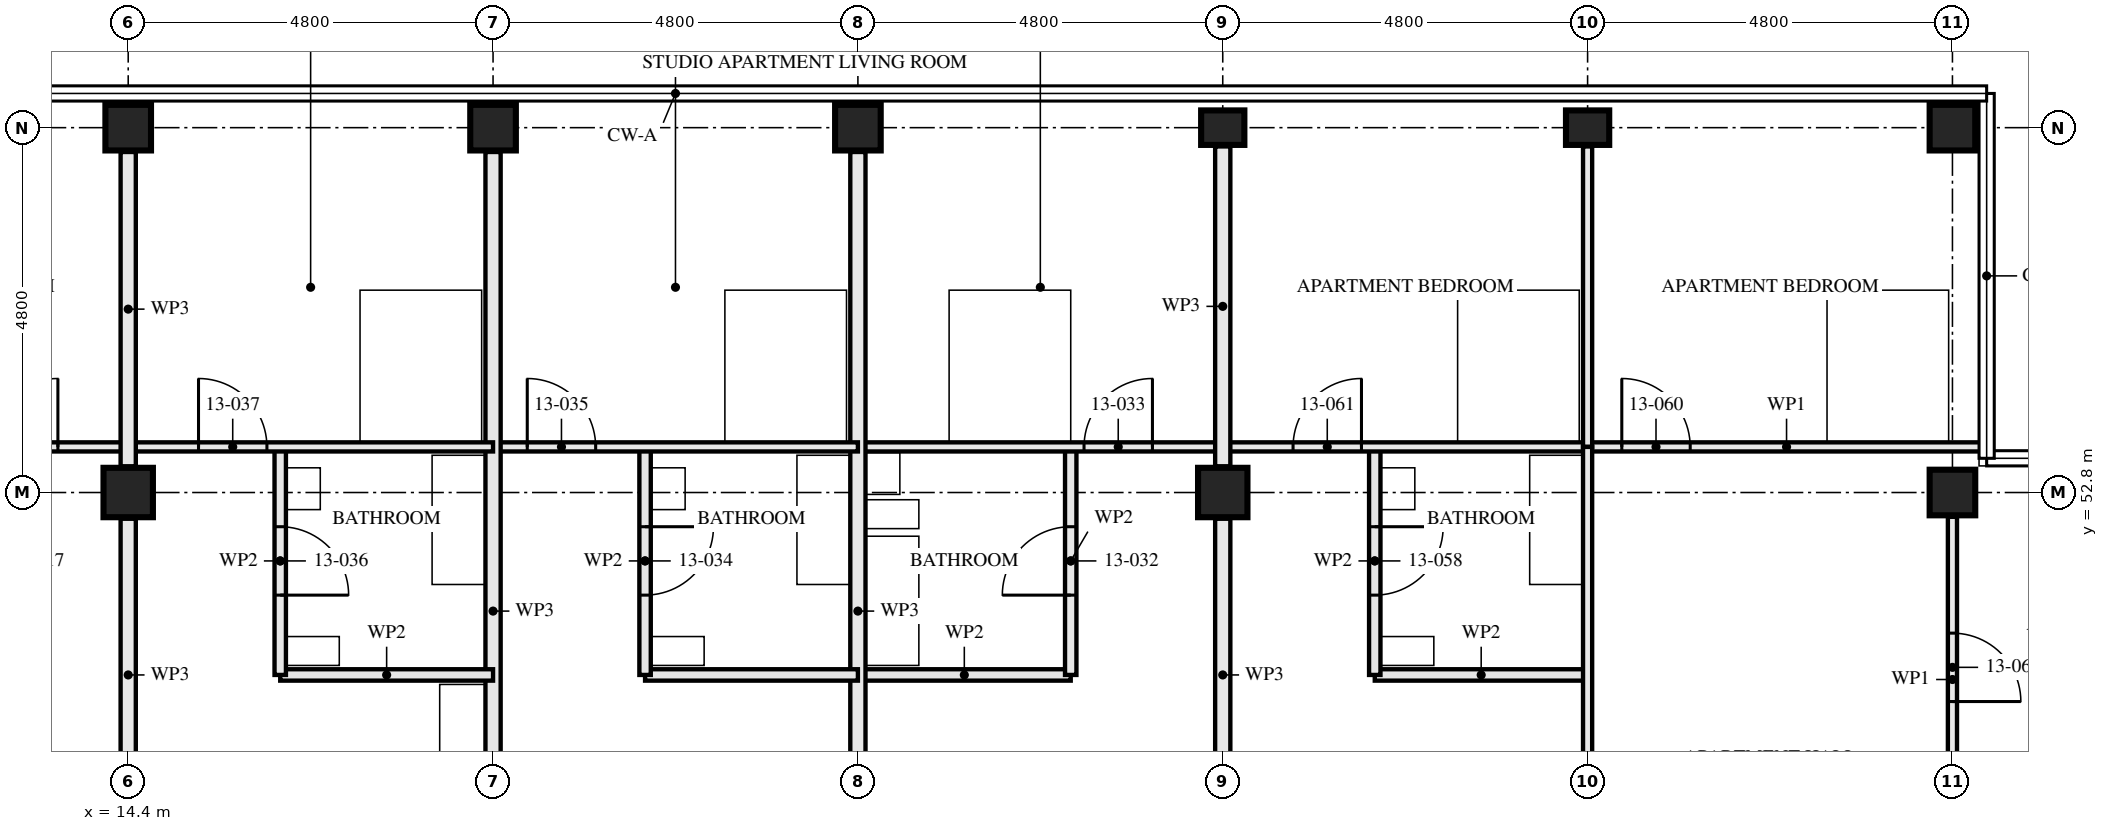
"""IFC4 building model, lengths in metres.
Left out: names, types, materials, properties, quantities, classifications, styles, units other than length and angle.
Written with IfcOpenShell. Run it as: python <this file> out.ifc"""

import sys

from ifc_helpers import new_model, si_unit, direction, frame, frame_2d, origin, origin_2d, place, context, subcontext, project, spatial, rectangle, hollow_rectangle, i_section, extrude, element, fill, save


model = new_model("IFC4")
c1 = context("Model", 3, precision=1e-05, world=origin(), true_north=direction((0.0, 1.0)))
c2 = subcontext(c1, "Body", "Model", "MODEL_VIEW")
j1 = project(units=[si_unit("LENGTHUNIT", "METRE"), si_unit("PLANEANGLEUNIT", "RADIAN")], contexts=[c1])
p1 = place(None, origin())
s1 = spatial("IfcSite", under=j1, at=p1, CompositionType="ELEMENT")
p2 = place(p1, origin())
s2 = spatial("IfcBuilding", under=s1, at=p2, CompositionType="ELEMENT")
p3 = place(p2, frame((0.0, 0.0, 51.5)))
s3 = spatial("IfcBuildingStorey", under=s2, at=p3, CompositionType="ELEMENT", Elevation=51.5)
p4 = place(p3, frame((14.4, 52.8, 0.0), z_axis=(0.0, 0.0, 1.0), x_axis=(1.0, 0.0, 0.0)))
e1 = element("IfcColumn", 1, at=p4, inside=s3, PredefinedType="COLUMN", context=c2, shape_type="SweptSolid", body=[
    extrude(hollow_rectangle(XDim=0.65, YDim=0.65, WallThickness=0.05, at=origin_2d()), origin(), (0.0, 0.0, 1.0), 3.5),
])
for number, where, z_axis, x_axis in (
    (2, (14.4, 57.6, 0.0), (0.0, 0.0, 1.0), (0.0, 1.0, 0.0)),
    (3, (19.2, 57.6, 0.0), (0.0, 0.0, 1.0), (0.0, 1.0, 0.0)),
    (4, (24.0, 57.6, 0.0), (0.0, 0.0, 1.0), (0.0, 1.0, 0.0)),
):
    element("IfcColumn", number, at=place(p3, frame(where, z_axis=z_axis, x_axis=x_axis)), inside=s3, PredefinedType="COLUMN", context=c2, shape_type="SweptSolid", body=[
        extrude(hollow_rectangle(XDim=0.6, YDim=0.6, WallThickness=0.08, at=origin_2d()), origin(), (0.0, 0.0, 1.0), 3.5),
    ])
p5 = place(p3, frame((28.8, 52.8, 0.0), z_axis=(0.0, 0.0, 1.0), x_axis=(1.0, 0.0, 0.0)))
e5 = element("IfcColumn", 5, at=p5, inside=s3, PredefinedType="COLUMN", context=c2, shape_type="SweptSolid", body=[
    extrude(hollow_rectangle(XDim=0.65, YDim=0.65, WallThickness=0.05, at=origin_2d()), origin(), (0.0, 0.0, 1.0), 3.5),
])
for number, where, z_axis, x_axis in (
    (6, (28.8, 57.6, 0.0), (0.0, 0.0, 1.0), (0.0, 1.0, 0.0)),
    (7, (33.6, 57.6, 0.0), (0.0, 0.0, 1.0), (0.0, 1.0, 0.0)),
):
    element("IfcColumn", number, at=place(p3, frame(where, z_axis=z_axis, x_axis=x_axis)), inside=s3, PredefinedType="COLUMN", context=c2, shape_type="SweptSolid", body=[
        extrude(i_section(OverallWidth=0.454, OverallDepth=0.569, WebThickness=0.078, FlangeThickness=0.125, FilletRadius=0.015, at=origin_2d()), origin(), (0.0, 0.0, 1.0), 3.5),
    ])
for number, where, z_axis, x_axis in (
    (8, (38.4, 52.8, 0.0), (0.0, 0.0, 1.0), (0.0, 1.0, 0.0)),
    (9, (38.4, 57.6, 0.0), (0.0, 0.0, 1.0), (0.0, 1.0, 0.0)),
):
    element("IfcColumn", number, at=place(p3, frame(where, z_axis=z_axis, x_axis=x_axis)), inside=s3, PredefinedType="COLUMN", context=c2, shape_type="SweptSolid", body=[
        extrude(hollow_rectangle(XDim=0.6, YDim=0.6, WallThickness=0.05, at=origin_2d()), origin(), (0.0, 0.0, 1.0), 3.5),
    ])
p6 = place(p3, frame((14.4, 53.4, 0.0), z_axis=(0.0, 0.0, 1.0), x_axis=(-1.0, 0.0, 0.0)))
e10 = element("IfcWall", 10, at=p6, inside=s3, PredefinedType="PARTITIONING", context=c2, shape_type="SweptSolid", body=[
    extrude(rectangle(XDim=4.8, YDim=0.12, at=frame_2d((2.4, 0.0))), origin(), (0.0, 0.0, 1.0), 3.33),
])
p7 = place(p6, frame((0.925, 0.0, 0.0)))
e11 = element("IfcOpeningElement", 11, at=p7, cuts=e10, PredefinedType="OPENING", context=c2, shape_type="SweptSolid", body=[
    extrude(rectangle(XDim=0.9, YDim=2.1, at=frame_2d((0.45, 1.05))), frame((0.0, 0.071, 0.0), z_axis=(0.0, -1.0, 0.0), x_axis=(1.0, 0.0, 0.0)), (0.0, 0.0, 1.0), 0.141),
])
p8 = place(p3, frame((26.8, 53.4, 0.0), z_axis=(0.0, 0.0, 1.0), x_axis=(0.0, -1.0, 0.0)))
e12 = element("IfcWall", 12, at=p8, inside=s3, PredefinedType="PARTITIONING", context=c2, shape_type="SweptSolid", body=[
    extrude(rectangle(XDim=3.0, YDim=0.15, at=frame_2d((1.5, 0.0))), origin(), (0.0, 0.0, 1.0), 2.55),
])
p9 = place(p8, frame((1.05, 0.0, 0.0)))
e13 = element("IfcOpeningElement", 13, at=p9, cuts=e12, PredefinedType="OPENING", context=c2, shape_type="SweptSolid", body=[
    extrude(rectangle(XDim=0.9, YDim=2.1, at=frame_2d((0.45, 1.05))), frame((0.0, 0.085, 0.0), z_axis=(0.0, -1.0, 0.0), x_axis=(1.0, 0.0, 0.0)), (0.0, 0.0, 1.0), 0.171),
])
p10 = place(p3, frame((26.8, 50.4, 0.0), z_axis=(0.0, 0.0, 1.0), x_axis=(-1.0, 0.0, 0.0)))
e14 = element("IfcWall", 14, at=p10, inside=s3, PredefinedType="PARTITIONING", context=c2, shape_type="SweptSolid", body=[
    extrude(rectangle(XDim=2.8, YDim=0.15, at=frame_2d((1.4, 0.0))), origin(), (0.0, 0.0, 1.0), 3.33),
])
p11 = place(p3, frame((28.8, 53.4, 0.0), z_axis=(0.0, 0.0, 1.0), x_axis=(-1.0, 0.0, 0.0)))
e15 = element("IfcWall", 15, at=p11, inside=s3, PredefinedType="PARTITIONING", context=c2, shape_type="SweptSolid", body=[
    extrude(rectangle(XDim=4.8, YDim=0.12, at=frame_2d((2.4, 0.0))), origin(), (0.0, 0.0, 1.0), 3.33),
])
p12 = place(p11, frame((0.925, 0.0, 0.0)))
e16 = element("IfcOpeningElement", 16, at=p12, cuts=e15, PredefinedType="OPENING", context=c2, shape_type="SweptSolid", body=[
    extrude(rectangle(XDim=0.9, YDim=2.1, at=frame_2d((0.45, 1.05))), frame((0.0, 0.071, 0.0), z_axis=(0.0, -1.0, 0.0), x_axis=(1.0, 0.0, 0.0)), (0.0, 0.0, 1.0), 0.141),
])
p13 = place(p3, frame((24.0, 57.28, 0.0), z_axis=(0.0, 0.0, 1.0), x_axis=(0.0, -1.0, 0.0)))
e17 = element("IfcWall", 17, at=p13, inside=s3, PredefinedType="PARTITIONING", context=c2, shape_type="SweptSolid", body=[
    extrude(rectangle(XDim=12.08, YDim=0.2, at=frame_2d((6.04, 0.0))), origin(), (0.0, 0.0, 1.0), 2.55),
])
p14 = place(p3, frame((21.2, 53.4, 0.0), z_axis=(0.0, 0.0, 1.0), x_axis=(0.0, -1.0, 0.0)))
e18 = element("IfcWall", 18, at=p14, inside=s3, PredefinedType="PARTITIONING", context=c2, shape_type="SweptSolid", body=[
    extrude(rectangle(XDim=3.0, YDim=0.15, at=frame_2d((1.5, 0.0))), origin(), (0.0, 0.0, 1.0), 2.55),
])
p15 = place(p14, frame((1.05, 0.0, 0.0)))
e19 = element("IfcOpeningElement", 19, at=p15, cuts=e18, PredefinedType="OPENING", context=c2, shape_type="SweptSolid", body=[
    extrude(rectangle(XDim=0.9, YDim=2.1, at=frame_2d((0.45, 1.05))), frame((0.0, 0.085, 0.0), z_axis=(0.0, -1.0, 0.0), x_axis=(1.0, 0.0, 0.0)), (0.0, 0.0, 1.0), 0.171),
])
p16 = place(p3, frame((24.0, 50.4, 0.0), z_axis=(0.0, 0.0, 1.0), x_axis=(-1.0, 0.0, 0.0)))
e20 = element("IfcWall", 20, at=p16, inside=s3, PredefinedType="PARTITIONING", context=c2, shape_type="SweptSolid", body=[
    extrude(rectangle(XDim=2.8, YDim=0.15, at=frame_2d((1.4, 0.0))), origin(), (0.0, 0.0, 1.0), 3.33),
])
p17 = place(p3, frame((24.0, 53.4, 0.0), z_axis=(0.0, 0.0, 1.0), x_axis=(-1.0, 0.0, 0.0)))
e21 = element("IfcWall", 21, at=p17, inside=s3, PredefinedType="PARTITIONING", context=c2, shape_type="SweptSolid", body=[
    extrude(rectangle(XDim=4.8, YDim=0.12, at=frame_2d((2.4, 0.0))), origin(), (0.0, 0.0, 1.0), 3.33),
])
p18 = place(p17, frame((3.45, 0.0, 0.0)))
e22 = element("IfcOpeningElement", 22, at=p18, cuts=e21, PredefinedType="OPENING", context=c2, shape_type="SweptSolid", body=[
    extrude(rectangle(XDim=0.9, YDim=2.1, at=frame_2d((0.45, 1.05))), frame((0.0, 0.071, 0.0), z_axis=(0.0, -1.0, 0.0), x_axis=(1.0, 0.0, 0.0)), (0.0, 0.0, 1.0), 0.141),
])
p19 = place(p3, frame((19.2, 57.28, 0.0), z_axis=(0.0, 0.0, 1.0), x_axis=(0.0, -1.0, 0.0)))
e23 = element("IfcWall", 23, at=p19, inside=s3, PredefinedType="PARTITIONING", context=c2, shape_type="SweptSolid", body=[
    extrude(rectangle(XDim=12.08, YDim=0.2, at=frame_2d((6.04, 0.0))), origin(), (0.0, 0.0, 1.0), 2.55),
])
p20 = place(p3, frame((16.4, 53.4, 0.0), z_axis=(0.0, 0.0, 1.0), x_axis=(0.0, -1.0, 0.0)))
e24 = element("IfcWall", 24, at=p20, inside=s3, PredefinedType="PARTITIONING", context=c2, shape_type="SweptSolid", body=[
    extrude(rectangle(XDim=3.0, YDim=0.15, at=frame_2d((1.5, 0.0))), origin(), (0.0, 0.0, 1.0), 2.55),
])
p21 = place(p20, frame((1.05, 0.0, 0.0)))
e25 = element("IfcOpeningElement", 25, at=p21, cuts=e24, PredefinedType="OPENING", context=c2, shape_type="SweptSolid", body=[
    extrude(rectangle(XDim=0.9, YDim=2.1, at=frame_2d((0.45, 1.05))), frame((0.0, 0.085, 0.0), z_axis=(0.0, -1.0, 0.0), x_axis=(1.0, 0.0, 0.0)), (0.0, 0.0, 1.0), 0.171),
])
p22 = place(p3, frame((19.2, 50.4, 0.0), z_axis=(0.0, 0.0, 1.0), x_axis=(-1.0, 0.0, 0.0)))
e26 = element("IfcWall", 26, at=p22, inside=s3, PredefinedType="PARTITIONING", context=c2, shape_type="SweptSolid", body=[
    extrude(rectangle(XDim=2.8, YDim=0.15, at=frame_2d((1.4, 0.0))), origin(), (0.0, 0.0, 1.0), 3.33),
])
p23 = place(p3, frame((19.2, 53.4, 0.0), z_axis=(0.0, 0.0, 1.0), x_axis=(-1.0, 0.0, 0.0)))
e27 = element("IfcWall", 27, at=p23, inside=s3, PredefinedType="PARTITIONING", context=c2, shape_type="SweptSolid", body=[
    extrude(rectangle(XDim=4.8, YDim=0.12, at=frame_2d((2.4, 0.0))), origin(), (0.0, 0.0, 1.0), 3.33),
])
p24 = place(p23, frame((2.975, 0.0, 0.0)))
e28 = element("IfcOpeningElement", 28, at=p24, cuts=e27, PredefinedType="OPENING", context=c2, shape_type="SweptSolid", body=[
    extrude(rectangle(XDim=0.9, YDim=2.1, at=frame_2d((0.45, 1.05))), frame((0.0, 0.071, 0.0), z_axis=(0.0, -1.0, 0.0), x_axis=(1.0, 0.0, 0.0)), (0.0, 0.0, 1.0), 0.141),
])
p25 = place(p3, frame((30.8, 53.4, 0.0), z_axis=(0.0, 0.0, 1.0), x_axis=(0.0, -1.0, 0.0)))
e29 = element("IfcWall", 29, at=p25, inside=s3, PredefinedType="PARTITIONING", context=c2, shape_type="SweptSolid", body=[
    extrude(rectangle(XDim=3.0, YDim=0.15, at=frame_2d((1.5, 0.0))), origin(), (0.0, 0.0, 1.0), 2.55),
])
p26 = place(p25, frame((1.05, 0.0, 0.0)))
e30 = element("IfcOpeningElement", 30, at=p26, cuts=e29, PredefinedType="OPENING", context=c2, shape_type="SweptSolid", body=[
    extrude(rectangle(XDim=0.9, YDim=2.1, at=frame_2d((0.45, 1.05))), frame((0.0, 0.085, 0.0), z_axis=(0.0, -1.0, 0.0), x_axis=(1.0, 0.0, 0.0)), (0.0, 0.0, 1.0), 0.171),
])
p27 = place(p3, frame((33.6, 50.4, 0.0), z_axis=(0.0, 0.0, 1.0), x_axis=(-1.0, 0.0, 0.0)))
e31 = element("IfcWall", 31, at=p27, inside=s3, PredefinedType="PARTITIONING", context=c2, shape_type="SweptSolid", body=[
    extrude(rectangle(XDim=2.8, YDim=0.15, at=frame_2d((1.4, 0.0))), origin(), (0.0, 0.0, 1.0), 3.33),
])
p28 = place(p3, frame((33.6, 53.4, 0.0), z_axis=(0.0, 0.0, 1.0), x_axis=(0.0, -1.0, 0.0)))
e32 = element("IfcWall", 32, at=p28, inside=s3, PredefinedType="PARTITIONING", context=c2, shape_type="SweptSolid", body=[
    extrude(rectangle(XDim=8.25, YDim=0.12, at=frame_2d((4.125, 0.0))), origin(), (0.0, 0.0, 1.0), 2.55),
])
p29 = place(p28, frame((5.15, 0.0, 0.0)))
e33 = element("IfcOpeningElement", 33, at=p29, cuts=e32, PredefinedType="OPENING", context=c2, shape_type="SweptSolid", body=[
    extrude(rectangle(XDim=0.9, YDim=2.1, at=frame_2d((0.45, 1.05))), frame((0.0, 0.071, 0.0), z_axis=(0.0, -1.0, 0.0), x_axis=(1.0, 0.0, 0.0)), (0.0, 0.0, 1.0), 0.141),
])
p30 = place(p3, frame((38.835, 53.4, 0.0), z_axis=(0.0, 0.0, 1.0), x_axis=(-1.0, 0.0, 0.0)))
e34 = element("IfcWall", 34, at=p30, inside=s3, PredefinedType="PARTITIONING", context=c2, shape_type="SweptSolid", body=[
    extrude(rectangle(XDim=5.235, YDim=0.12, at=frame_2d((2.617, 0.0))), origin(), (0.0, 0.0, 1.0), 2.32),
])
p31 = place(p30, frame((3.885, 0.0, 0.0)))
e35 = element("IfcOpeningElement", 35, at=p31, cuts=e34, PredefinedType="OPENING", context=c2, shape_type="SweptSolid", body=[
    extrude(rectangle(XDim=0.9, YDim=2.1, at=frame_2d((0.45, 1.05))), frame((0.0, 0.071, 0.0), z_axis=(0.0, -1.0, 0.0), x_axis=(1.0, 0.0, 0.0)), (0.0, 0.0, 1.0), 0.141),
])
p32 = place(p3, frame((33.6, 53.4, 0.0), z_axis=(0.0, 0.0, 1.0), x_axis=(-1.0, 0.0, 0.0)))
e36 = element("IfcWall", 36, at=p32, inside=s3, PredefinedType="PARTITIONING", context=c2, shape_type="SweptSolid", body=[
    extrude(rectangle(XDim=4.8, YDim=0.12, at=frame_2d((2.4, 0.0))), origin(), (0.0, 0.0, 1.0), 3.33),
])
p33 = place(p32, frame((2.975, 0.0, 0.0)))
e37 = element("IfcOpeningElement", 37, at=p33, cuts=e36, PredefinedType="OPENING", context=c2, shape_type="SweptSolid", body=[
    extrude(rectangle(XDim=0.9, YDim=2.1, at=frame_2d((0.45, 1.05))), frame((0.0, 0.071, 0.0), z_axis=(0.0, -1.0, 0.0), x_axis=(1.0, 0.0, 0.0)), (0.0, 0.0, 1.0), 0.141),
])
p34 = place(p3, frame((38.4, 52.48, 0.0), z_axis=(0.0, 0.0, 1.0), x_axis=(0.0, -1.0, 0.0)))
e38 = element("IfcWall", 38, at=p34, inside=s3, PredefinedType="PARTITIONING", context=c2, shape_type="SweptSolid", body=[
    extrude(rectangle(XDim=4.28, YDim=0.12, at=frame_2d((2.14, 0.0))), origin(), (0.0, 0.0, 1.0), 3.33),
])
p35 = place(p34, frame((1.53, 0.0, 0.0)))
e39 = element("IfcOpeningElement", 39, at=p35, cuts=e38, PredefinedType="OPENING", context=c2, shape_type="SweptSolid", body=[
    extrude(rectangle(XDim=0.9, YDim=2.1, at=frame_2d((0.45, 1.05))), frame((0.0, 0.071, 0.0), z_axis=(0.0, -1.0, 0.0), x_axis=(1.0, 0.0, 0.0)), (0.0, 0.0, 1.0), 0.141),
])
p36 = place(p3, frame((33.6, 57.353, 0.0), z_axis=(0.0, 0.0, 1.0), x_axis=(0.0, -1.0, 0.0)))
e40 = element("IfcWall", 40, at=p36, inside=s3, PredefinedType="PARTITIONING", context=c2, shape_type="SweptSolid", body=[
    extrude(rectangle(XDim=3.953, YDim=0.12, at=frame_2d((1.977, 0.0))), origin(), (0.0, 0.0, 1.0), 3.33),
])
p37 = place(p3, frame((14.4, 48.345, 0.0), z_axis=(0.0, 0.0, 1.0), x_axis=(0.0, 1.0, 0.0)))
e41 = element("IfcWall", 41, at=p37, inside=s3, PredefinedType="PARTITIONING", context=c2, shape_type="SweptSolid", body=[
    extrude(rectangle(XDim=4.11, YDim=0.2, at=frame_2d((2.055, 0.0))), origin(), (0.0, 0.0, 1.0), 2.32),
])
p38 = place(p3, frame((14.4, 53.145, 0.0), z_axis=(0.0, 0.0, 1.0), x_axis=(0.0, 1.0, 0.0)))
e42 = element("IfcWall", 42, at=p38, inside=s3, PredefinedType="PARTITIONING", context=c2, shape_type="SweptSolid", body=[
    extrude(rectangle(XDim=4.135, YDim=0.2, at=frame_2d((2.067, 0.0))), origin(), (0.0, 0.0, 1.0), 2.32),
])
p39 = place(p3, frame((28.8, 48.345, 0.0), z_axis=(0.0, 0.0, 1.0), x_axis=(0.0, 1.0, 0.0)))
e43 = element("IfcWall", 43, at=p39, inside=s3, PredefinedType="PARTITIONING", context=c2, shape_type="SweptSolid", body=[
    extrude(rectangle(XDim=4.11, YDim=0.2, at=frame_2d((2.055, 0.0))), origin(), (0.0, 0.0, 1.0), 2.32),
])
p40 = place(p3, frame((28.8, 53.145, 0.0), z_axis=(0.0, 0.0, 1.0), x_axis=(0.0, 1.0, 0.0)))
e44 = element("IfcWall", 44, at=p40, inside=s3, PredefinedType="PARTITIONING", context=c2, shape_type="SweptSolid", body=[
    extrude(rectangle(XDim=4.208, YDim=0.2, at=frame_2d((2.104, 0.0))), origin(), (0.0, 0.0, 1.0), 2.32),
])
p41 = place(p7, frame((0.9, 0.0, 0.0), z_axis=(0.0, 0.0, 1.0), x_axis=(-1.0, 0.0, 0.0)))
e45 = element("IfcDoor", 45, at=p41, inside=s3, OperationType="SINGLE_SWING_LEFT", PredefinedType="DOOR", context=c2, shape_type="SweptSolid", body=[
    extrude(rectangle(XDim=0.9, YDim=2.1, at=frame_2d((0.45, 1.05))), frame((0.0, 0.022, 0.0), z_axis=(0.0, -1.0, 0.0), x_axis=(1.0, 0.0, 0.0)), (0.0, 0.0, 1.0), 0.044),
])
fill(e11, e45)
p42 = place(p9, frame((0.9, 0.0, 0.0), z_axis=(0.0, 0.0, 1.0), x_axis=(-1.0, 0.0, 0.0)))
e46 = element("IfcDoor", 46, at=p42, inside=s3, OperationType="SINGLE_SWING_RIGHT", PredefinedType="DOOR", context=c2, shape_type="SweptSolid", body=[
    extrude(rectangle(XDim=0.9, YDim=2.1, at=frame_2d((0.45, 1.05))), frame((0.0, 0.022, 0.0), z_axis=(0.0, -1.0, 0.0), x_axis=(1.0, 0.0, 0.0)), (0.0, 0.0, 1.0), 0.044),
])
fill(e13, e46)
p43 = place(p12, frame((0.9, 0.0, 0.0), z_axis=(0.0, 0.0, 1.0), x_axis=(-1.0, 0.0, 0.0)))
e47 = element("IfcDoor", 47, at=p43, inside=s3, OperationType="SINGLE_SWING_LEFT", PredefinedType="DOOR", context=c2, shape_type="SweptSolid", body=[
    extrude(rectangle(XDim=0.9, YDim=2.1, at=frame_2d((0.45, 1.05))), frame((0.0, 0.022, 0.0), z_axis=(0.0, -1.0, 0.0), x_axis=(1.0, 0.0, 0.0)), (0.0, 0.0, 1.0), 0.044),
])
fill(e16, e47)
p44 = place(p15, origin())
e48 = element("IfcDoor", 48, at=p44, inside=s3, OperationType="SINGLE_SWING_RIGHT", PredefinedType="DOOR", context=c2, shape_type="SweptSolid", body=[
    extrude(rectangle(XDim=0.9, YDim=2.1, at=frame_2d((0.45, 1.05))), frame((0.0, 0.022, 0.0), z_axis=(0.0, -1.0, 0.0), x_axis=(1.0, 0.0, 0.0)), (0.0, 0.0, 1.0), 0.044),
])
fill(e19, e48)
p45 = place(p18, frame((0.9, 0.0, 0.0), z_axis=(0.0, 0.0, 1.0), x_axis=(-1.0, 0.0, 0.0)))
e49 = element("IfcDoor", 49, at=p45, inside=s3, OperationType="SINGLE_SWING_RIGHT", PredefinedType="DOOR", context=c2, shape_type="SweptSolid", body=[
    extrude(rectangle(XDim=0.9, YDim=2.1, at=frame_2d((0.45, 1.05))), frame((0.0, 0.022, 0.0), z_axis=(0.0, -1.0, 0.0), x_axis=(1.0, 0.0, 0.0)), (0.0, 0.0, 1.0), 0.044),
])
fill(e22, e49)
p46 = place(p21, origin())
e50 = element("IfcDoor", 50, at=p46, inside=s3, OperationType="SINGLE_SWING_LEFT", PredefinedType="DOOR", context=c2, shape_type="SweptSolid", body=[
    extrude(rectangle(XDim=0.9, YDim=2.1, at=frame_2d((0.45, 1.05))), frame((0.0, 0.022, 0.0), z_axis=(0.0, -1.0, 0.0), x_axis=(1.0, 0.0, 0.0)), (0.0, 0.0, 1.0), 0.044),
])
fill(e25, e50)
p47 = place(p24, frame((0.9, 0.0, 0.0), z_axis=(0.0, 0.0, 1.0), x_axis=(-1.0, 0.0, 0.0)))
e51 = element("IfcDoor", 51, at=p47, inside=s3, OperationType="SINGLE_SWING_RIGHT", PredefinedType="DOOR", context=c2, shape_type="SweptSolid", body=[
    extrude(rectangle(XDim=0.9, YDim=2.1, at=frame_2d((0.45, 1.05))), frame((0.0, 0.022, 0.0), z_axis=(0.0, -1.0, 0.0), x_axis=(1.0, 0.0, 0.0)), (0.0, 0.0, 1.0), 0.044),
])
fill(e28, e51)
p48 = place(p26, origin())
e52 = element("IfcDoor", 52, at=p48, inside=s3, OperationType="SINGLE_SWING_RIGHT", PredefinedType="DOOR", context=c2, shape_type="SweptSolid", body=[
    extrude(rectangle(XDim=0.9, YDim=2.1, at=frame_2d((0.45, 1.05))), frame((0.0, 0.022, 0.0), z_axis=(0.0, -1.0, 0.0), x_axis=(1.0, 0.0, 0.0)), (0.0, 0.0, 1.0), 0.044),
])
fill(e30, e52)
p49 = place(p31, frame((0.9, 0.0, 0.0), z_axis=(0.0, 0.0, 1.0), x_axis=(-1.0, 0.0, 0.0)))
e53 = element("IfcDoor", 53, at=p49, inside=s3, OperationType="SINGLE_SWING_RIGHT", PredefinedType="DOOR", context=c2, shape_type="SweptSolid", body=[
    extrude(rectangle(XDim=0.9, YDim=2.1, at=frame_2d((0.45, 1.05))), frame((0.0, 0.022, 0.0), z_axis=(0.0, -1.0, 0.0), x_axis=(1.0, 0.0, 0.0)), (0.0, 0.0, 1.0), 0.044),
])
fill(e35, e53)
p50 = place(p33, frame((0.9, 0.0, 0.0), z_axis=(0.0, 0.0, 1.0), x_axis=(-1.0, 0.0, 0.0)))
e54 = element("IfcDoor", 54, at=p50, inside=s3, OperationType="SINGLE_SWING_LEFT", PredefinedType="DOOR", context=c2, shape_type="SweptSolid", body=[
    extrude(rectangle(XDim=0.9, YDim=2.1, at=frame_2d((0.45, 1.05))), frame((0.0, 0.022, 0.0), z_axis=(0.0, -1.0, 0.0), x_axis=(1.0, 0.0, 0.0)), (0.0, 0.0, 1.0), 0.044),
])
fill(e37, e54)
p51 = place(p35, origin())
e55 = element("IfcDoor", 55, at=p51, inside=s3, OperationType="SINGLE_SWING_LEFT", PredefinedType="DOOR", context=c2, shape_type="SweptSolid", body=[
    extrude(rectangle(XDim=0.9, YDim=2.1, at=frame_2d((0.45, 1.05))), frame((0.0, 0.022, 0.0), z_axis=(0.0, -1.0, 0.0), x_axis=(1.0, 0.0, 0.0)), (0.0, 0.0, 1.0), 0.044),
])
fill(e39, e55)
save(model, sys.argv[1])
